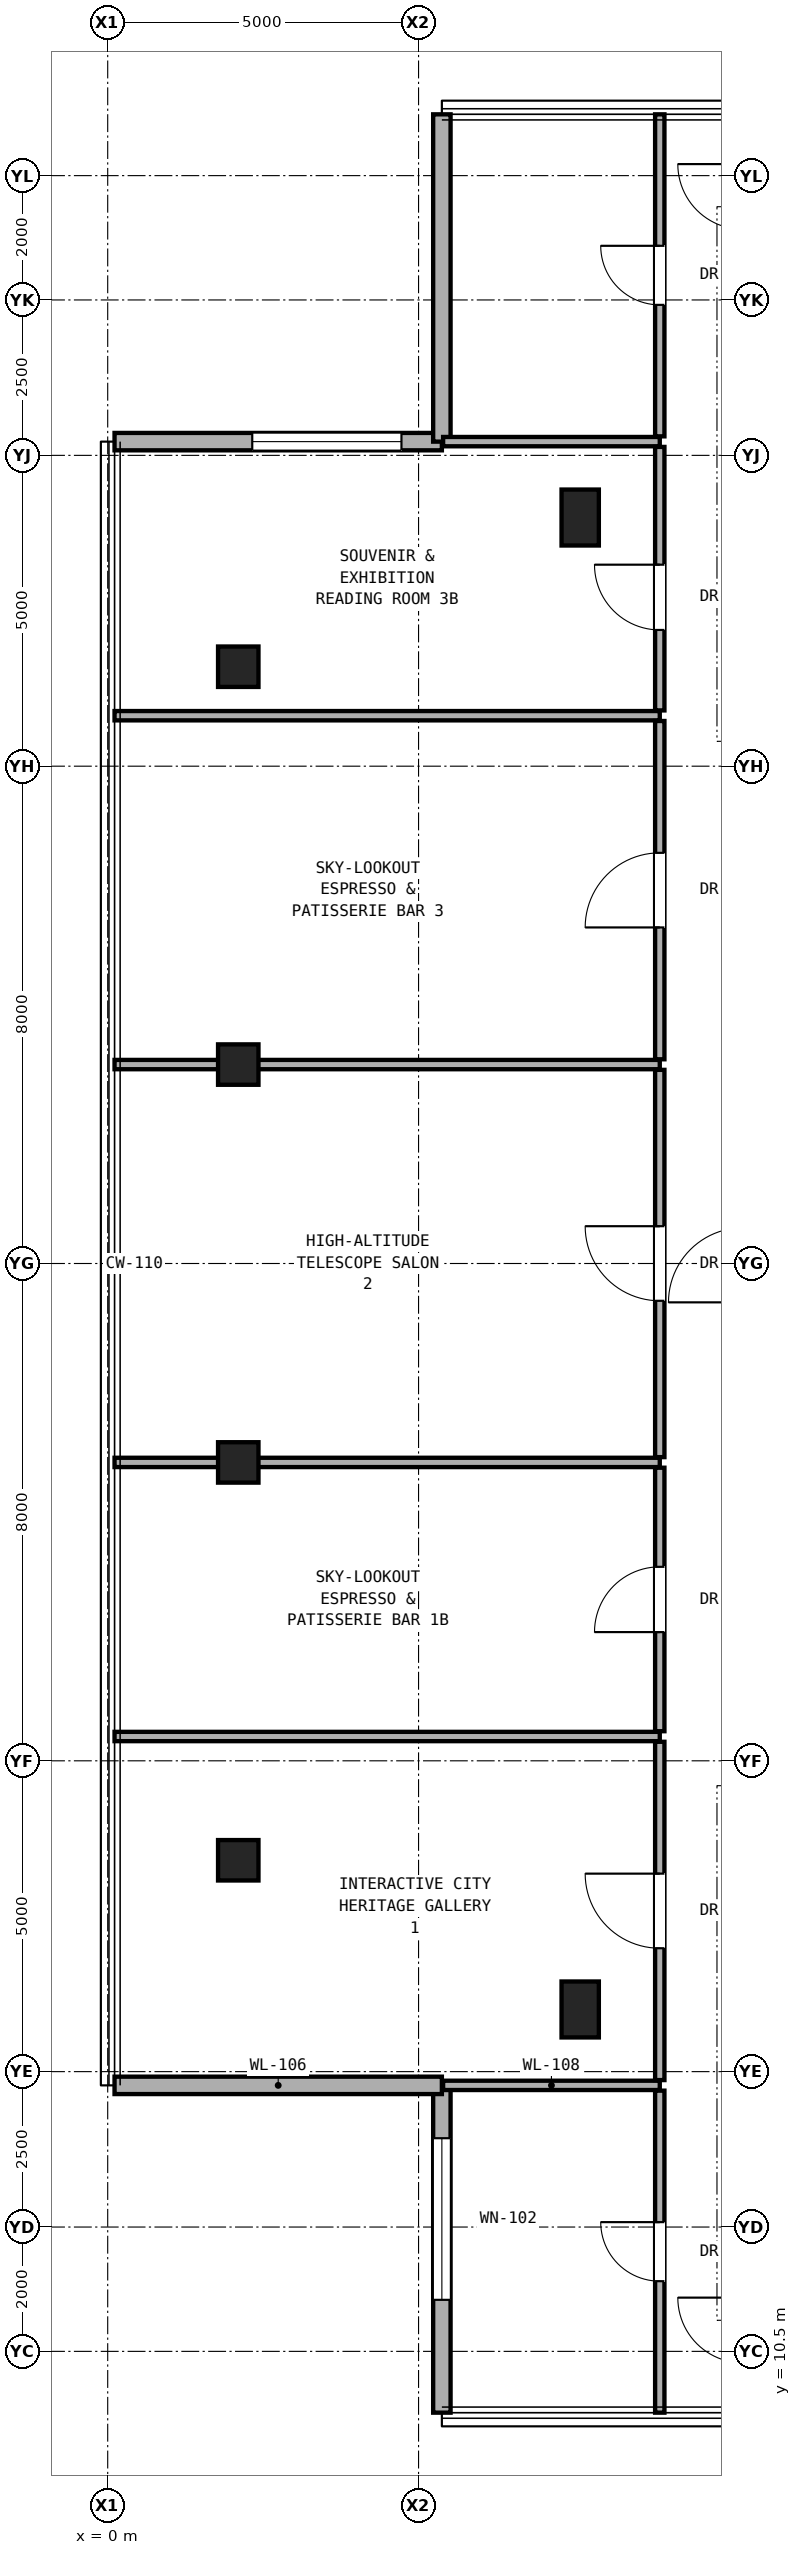
"""IFC4 building model, lengths in metres.
Left out: names, types, materials, properties, quantities, classifications, styles, units other than length and angle.
Written with IfcOpenShell. Run it as: python <this file> out.ifc"""

import sys

from ifc_helpers import new_model, si_unit, direction, frame, frame_2d, origin, origin_2d, place, context, subcontext, project, spatial, rectangle, hollow_rectangle, extrude, element, fill, save


model = new_model("IFC4")
c1 = context("Model", 3, precision=1e-05, world=origin(), true_north=direction((0.0, 1.0)))
c2 = subcontext(c1, "Body", "Model", "MODEL_VIEW")
j1 = project(units=[si_unit("LENGTHUNIT", "METRE"), si_unit("PLANEANGLEUNIT", "RADIAN")], contexts=[c1])
p1 = place(None, origin())
s1 = spatial("IfcSite", under=j1, at=p1, CompositionType="ELEMENT")
p2 = place(p1, origin())
s2 = spatial("IfcBuilding", under=s1, at=p2, CompositionType="ELEMENT")
p3 = place(p2, frame((0.0, 0.0, 256.3)))
s3 = spatial("IfcBuildingStorey", under=s2, at=p3, CompositionType="ELEMENT", Elevation=256.3)
for number, where, z_axis, x_axis in (
    (1, (2.1, 18.4, 0.0), (0.0, 0.0, 1.0), (1.0, 0.0, 0.0)),
    (2, (2.1, 24.8, 0.0), (0.0, 0.0, 1.0), (1.0, 0.0, 0.0)),
    (3, (2.1, 31.2, 0.0), (0.0, 0.0, 1.0), (1.0, 0.0, 0.0)),
    (4, (2.1, 37.6, 0.0), (0.0, 0.0, 1.0), (1.0, 0.0, 0.0)),
):
    element("IfcColumn", number, at=place(p3, frame(where, z_axis=z_axis, x_axis=x_axis)), inside=s3, PredefinedType="COLUMN", context=c2, shape_type="SweptSolid", body=[
        extrude(hollow_rectangle(XDim=0.65, YDim=0.65, WallThickness=0.036, at=origin_2d()), origin(), (0.0, 0.0, 1.0), 3.6),
    ])
for number, where, z_axis, x_axis in (
    (5, (7.6, 16.0, 0.0), (0.0, 0.0, 1.0), (1.0, 0.0, 0.0)),
    (6, (7.6, 40.0, 0.0), (0.0, 0.0, 1.0), (1.0, 0.0, 0.0)),
):
    element("IfcColumn", number, at=place(p3, frame(where, z_axis=z_axis, x_axis=x_axis)), inside=s3, PredefinedType="PILASTER", context=c2, shape_type="SweptSolid", body=[
        extrude(rectangle(XDim=0.6, YDim=0.9, at=origin_2d()), origin(), (0.0, 0.0, 1.0), 3.6),
    ])
p4 = place(p3, frame((5.375, 14.779, 0.0), z_axis=(0.0, 0.0, 1.0), x_axis=(0.0, -1.0, 0.0)))
e7 = element("IfcWall", 7, at=p4, inside=s3, PredefinedType="SOLIDWALL", context=c2, shape_type="SweptSolid", body=[
    extrude(rectangle(XDim=5.265, YDim=0.28, at=frame_2d((2.633, 0.0))), origin(), (0.0, 0.0, 1.0), 3.38),
])
p5 = place(p4, frame((0.85, 0.0, 0.63)))
e8 = element("IfcOpeningElement", 8, at=p5, cuts=e7, PredefinedType="OPENING", context=c2, shape_type="SweptSolid", body=[
    extrude(rectangle(XDim=2.6, YDim=2.6, at=frame_2d((1.3, 1.3))), frame((0.0, 0.15, 0.0), z_axis=(0.0, -1.0, 0.0), x_axis=(1.0, 0.0, 0.0)), (0.0, 0.0, 1.0), 0.3),
])
p6 = place(p3, frame((0.11, 14.779, 0.0), z_axis=(0.0, 0.0, 1.0), x_axis=(1.0, 0.0, 0.0)))
e9 = element("IfcWall", 9, at=p6, inside=s3, PredefinedType="SOLIDWALL", context=c2, shape_type="SweptSolid", body=[
    extrude(rectangle(XDim=5.265, YDim=0.28, at=frame_2d((2.632, 0.0))), origin(), (0.0, 0.0, 1.0), 3.38),
])
p7 = place(p3, frame((5.375, 41.221, 0.0), z_axis=(0.0, 0.0, 1.0), x_axis=(-1.0, 0.0, 0.0)))
e10 = element("IfcWall", 10, at=p7, inside=s3, PredefinedType="SOLIDWALL", context=c2, shape_type="SweptSolid", body=[
    extrude(rectangle(XDim=5.265, YDim=0.28, at=frame_2d((2.632, 0.0))), origin(), (0.0, 0.0, 1.0), 3.38),
])
p8 = place(p7, frame((0.65, 0.0, 0.85)))
e11 = element("IfcOpeningElement", 11, at=p8, cuts=e10, PredefinedType="OPENING", context=c2, shape_type="SweptSolid", body=[
    extrude(rectangle(XDim=2.4, YDim=2.35, at=frame_2d((1.2, 1.175))), frame((0.0, 0.15, 0.0), z_axis=(0.0, -1.0, 0.0), x_axis=(1.0, 0.0, 0.0)), (0.0, 0.0, 1.0), 0.3),
])
p9 = place(p3, frame((5.375, 46.486, 0.0), z_axis=(0.0, 0.0, 1.0), x_axis=(0.0, -1.0, 0.0)))
e12 = element("IfcWall", 12, at=p9, inside=s3, PredefinedType="SOLIDWALL", context=c2, shape_type="SweptSolid", body=[
    extrude(rectangle(XDim=5.265, YDim=0.28, at=frame_2d((2.633, 0.0))), origin(), (0.0, 0.0, 1.0), 3.38),
])
p10 = place(p3, frame((5.395, 14.779, 0.0), z_axis=(0.0, 0.0, 1.0), x_axis=(1.0, 0.0, 0.0)))
e13 = element("IfcWall", 13, at=p10, inside=s3, PredefinedType="PARTITIONING", context=c2, shape_type="SweptSolid", body=[
    extrude(rectangle(XDim=3.485, YDim=0.15, at=frame_2d((1.742, 0.0))), origin(), (0.0, 0.0, 1.0), 3.4),
])
for number, where, z_axis, x_axis in (
    (14, (0.11, 20.391, 0.0), (0.0, 0.0, 1.0), (1.0, 0.0, 0.0)),
    (15, (0.11, 24.8, 0.0), (0.0, 0.0, 1.0), (1.0, 0.0, 0.0)),
    (16, (0.11, 31.2, 0.0), (0.0, 0.0, 1.0), (1.0, 0.0, 0.0)),
    (17, (0.11, 36.812, 0.0), (0.0, 0.0, 1.0), (1.0, 0.0, 0.0)),
):
    element("IfcWall", number, at=place(p3, frame(where, z_axis=z_axis, x_axis=x_axis)), inside=s3, PredefinedType="PARTITIONING", context=c2, shape_type="SweptSolid", body=[
        extrude(rectangle(XDim=8.77, YDim=0.15, at=frame_2d((4.385, 0.0))), origin(), (0.0, 0.0, 1.0), 2.619),
    ])
p11 = place(p3, frame((5.395, 41.221, 0.0), z_axis=(0.0, 0.0, 1.0), x_axis=(1.0, 0.0, 0.0)))
e18 = element("IfcWall", 18, at=p11, inside=s3, PredefinedType="PARTITIONING", context=c2, shape_type="SweptSolid", body=[
    extrude(rectangle(XDim=3.485, YDim=0.15, at=frame_2d((1.742, 0.0))), origin(), (0.0, 0.0, 1.0), 3.4),
])
p12 = place(p3, frame((8.88, 9.514, 0.0), z_axis=(0.0, 0.0, 1.0), x_axis=(0.0, 1.0, 0.0)))
e19 = element("IfcWall", 19, at=p12, inside=s3, PredefinedType="PARTITIONING", context=c2, shape_type="SweptSolid", body=[
    extrude(rectangle(XDim=5.18, YDim=0.15, at=frame_2d((2.59, 0.0))), origin(), (0.0, 0.0, 1.0), 3.4),
])
p13 = place(p12, frame((2.115, 0.0, 0.0)))
e20 = element("IfcOpeningElement", 20, at=p13, cuts=e19, PredefinedType="OPENING", context=c2, shape_type="SweptSolid", body=[
    extrude(rectangle(XDim=0.95, YDim=2.15, at=frame_2d((0.475, 1.075))), frame((0.0, 0.085, 0.0), z_axis=(0.0, -1.0, 0.0), x_axis=(1.0, 0.0, 0.0)), (0.0, 0.0, 1.0), 0.17),
])
p14 = place(p3, frame((8.88, 14.864, 0.0), z_axis=(0.0, 0.0, 1.0), x_axis=(0.0, 1.0, 0.0)))
e21 = element("IfcWall", 21, at=p14, inside=s3, PredefinedType="PARTITIONING", context=c2, shape_type="SweptSolid", body=[
    extrude(rectangle(XDim=5.442, YDim=0.15, at=frame_2d((2.721, 0.0))), origin(), (0.0, 0.0, 1.0), 2.792),
])
p15 = place(p14, frame((2.121, 0.0, 0.0)))
e22 = element("IfcOpeningElement", 22, at=p15, cuts=e21, PredefinedType="OPENING", context=c2, shape_type="SweptSolid", body=[
    extrude(rectangle(XDim=1.2, YDim=2.25, at=frame_2d((0.6, 1.125))), frame((0.0, 0.085, 0.0), z_axis=(0.0, -1.0, 0.0), x_axis=(1.0, 0.0, 0.0)), (0.0, 0.0, 1.0), 0.17),
])
p16 = place(p3, frame((8.88, 20.476, 0.0), z_axis=(0.0, 0.0, 1.0), x_axis=(0.0, 1.0, 0.0)))
e23 = element("IfcWall", 23, at=p16, inside=s3, PredefinedType="PARTITIONING", context=c2, shape_type="SweptSolid", body=[
    extrude(rectangle(XDim=4.239, YDim=0.15, at=frame_2d((2.12, 0.0))), origin(), (0.0, 0.0, 1.0), 2.696),
])
p17 = place(p16, frame((1.594, 0.0, 0.0)))
e24 = element("IfcOpeningElement", 24, at=p17, cuts=e23, PredefinedType="OPENING", context=c2, shape_type="SweptSolid", body=[
    extrude(rectangle(XDim=1.05, YDim=2.2, at=frame_2d((0.525, 1.1))), frame((0.0, 0.085, 0.0), z_axis=(0.0, -1.0, 0.0), x_axis=(1.0, 0.0, 0.0)), (0.0, 0.0, 1.0), 0.17),
])
p18 = place(p3, frame((8.88, 24.885, 0.0), z_axis=(0.0, 0.0, 1.0), x_axis=(0.0, 1.0, 0.0)))
e25 = element("IfcWall", 25, at=p18, inside=s3, PredefinedType="PARTITIONING", context=c2, shape_type="SweptSolid", body=[
    extrude(rectangle(XDim=6.23, YDim=0.15, at=frame_2d((3.115, 0.0))), origin(), (0.0, 0.0, 1.0), 2.696),
])
p19 = place(p18, frame((2.515, 0.0, 0.0)))
e26 = element("IfcOpeningElement", 26, at=p19, cuts=e25, PredefinedType="OPENING", context=c2, shape_type="SweptSolid", body=[
    extrude(rectangle(XDim=1.2, YDim=2.25, at=frame_2d((0.6, 1.125))), frame((0.0, 0.085, 0.0), z_axis=(0.0, -1.0, 0.0), x_axis=(1.0, 0.0, 0.0)), (0.0, 0.0, 1.0), 0.17),
])
p20 = place(p3, frame((8.88, 31.285, 0.0), z_axis=(0.0, 0.0, 1.0), x_axis=(0.0, 1.0, 0.0)))
e27 = element("IfcWall", 27, at=p20, inside=s3, PredefinedType="PARTITIONING", context=c2, shape_type="SweptSolid", body=[
    extrude(rectangle(XDim=5.442, YDim=0.15, at=frame_2d((2.721, 0.0))), origin(), (0.0, 0.0, 1.0), 2.696),
])
p21 = place(p20, frame((2.121, 0.0, 0.0)))
e28 = element("IfcOpeningElement", 28, at=p21, cuts=e27, PredefinedType="OPENING", context=c2, shape_type="SweptSolid", body=[
    extrude(rectangle(XDim=1.2, YDim=2.25, at=frame_2d((0.6, 1.125))), frame((0.0, 0.085, 0.0), z_axis=(0.0, -1.0, 0.0), x_axis=(1.0, 0.0, 0.0)), (0.0, 0.0, 1.0), 0.17),
])
p22 = place(p3, frame((8.88, 36.897, 0.0), z_axis=(0.0, 0.0, 1.0), x_axis=(0.0, 1.0, 0.0)))
e29 = element("IfcWall", 29, at=p22, inside=s3, PredefinedType="PARTITIONING", context=c2, shape_type="SweptSolid", body=[
    extrude(rectangle(XDim=4.239, YDim=0.15, at=frame_2d((2.12, 0.0))), origin(), (0.0, 0.0, 1.0), 2.792),
])
p23 = place(p22, frame((1.294, 0.0, 0.0)))
e30 = element("IfcOpeningElement", 30, at=p23, cuts=e29, PredefinedType="OPENING", context=c2, shape_type="SweptSolid", body=[
    extrude(rectangle(XDim=1.05, YDim=2.2, at=frame_2d((0.525, 1.1))), frame((0.0, 0.085, 0.0), z_axis=(0.0, -1.0, 0.0), x_axis=(1.0, 0.0, 0.0)), (0.0, 0.0, 1.0), 0.17),
])
p24 = place(p3, frame((8.88, 41.306, 0.0), z_axis=(0.0, 0.0, 1.0), x_axis=(0.0, 1.0, 0.0)))
e31 = element("IfcWall", 31, at=p24, inside=s3, PredefinedType="PARTITIONING", context=c2, shape_type="SweptSolid", body=[
    extrude(rectangle(XDim=5.18, YDim=0.15, at=frame_2d((2.59, 0.0))), origin(), (0.0, 0.0, 1.0), 3.4),
])
p25 = place(p24, frame((2.115, 0.0, 0.0)))
e32 = element("IfcOpeningElement", 32, at=p25, cuts=e31, PredefinedType="OPENING", context=c2, shape_type="SweptSolid", body=[
    extrude(rectangle(XDim=0.95, YDim=2.15, at=frame_2d((0.475, 1.075))), frame((0.0, 0.085, 0.0), z_axis=(0.0, -1.0, 0.0), x_axis=(1.0, 0.0, 0.0)), (0.0, 0.0, 1.0), 0.17),
])
p26 = place(p5, origin())
e33 = element("IfcWindow", 33, at=p26, inside=s3, PartitioningType="SINGLE_PANEL", PredefinedType="WINDOW", context=c2, shape_type="SweptSolid", body=[
    extrude(rectangle(XDim=2.6, YDim=2.6, at=frame_2d((1.3, 1.3))), frame((0.0, 0.03, 0.0), z_axis=(0.0, -1.0, 0.0), x_axis=(1.0, 0.0, 0.0)), (0.0, 0.0, 1.0), 0.06),
])
fill(e8, e33)
p27 = place(p8, origin())
e34 = element("IfcWindow", 34, at=p27, inside=s3, PartitioningType="SINGLE_PANEL", PredefinedType="WINDOW", context=c2, shape_type="SweptSolid", body=[
    extrude(rectangle(XDim=2.4, YDim=2.35, at=frame_2d((1.2, 1.175))), frame((0.0, 0.03, 0.0), z_axis=(0.0, -1.0, 0.0), x_axis=(1.0, 0.0, 0.0)), (0.0, 0.0, 1.0), 0.06),
])
fill(e11, e34)
p28 = place(p15, origin())
e35 = element("IfcDoor", 35, at=p28, inside=s3, OperationType="SINGLE_SWING_RIGHT", PredefinedType="DOOR", context=c2, shape_type="SweptSolid", body=[
    extrude(rectangle(XDim=1.2, YDim=2.25, at=frame_2d((0.6, 1.125))), frame((0.0, 0.025, 0.0), z_axis=(0.0, -1.0, 0.0), x_axis=(1.0, 0.0, 0.0)), (0.0, 0.0, 1.0), 0.05),
])
fill(e22, e35)
p29 = place(p17, origin())
e36 = element("IfcDoor", 36, at=p29, inside=s3, OperationType="SINGLE_SWING_LEFT", PredefinedType="DOOR", context=c2, shape_type="SweptSolid", body=[
    extrude(rectangle(XDim=1.05, YDim=2.2, at=frame_2d((0.525, 1.1))), frame((0.0, 0.025, 0.0), z_axis=(0.0, -1.0, 0.0), x_axis=(1.0, 0.0, 0.0)), (0.0, 0.0, 1.0), 0.05),
])
fill(e24, e36)
p30 = place(p19, origin())
e37 = element("IfcDoor", 37, at=p30, inside=s3, OperationType="SINGLE_SWING_RIGHT", PredefinedType="DOOR", context=c2, shape_type="SweptSolid", body=[
    extrude(rectangle(XDim=1.2, YDim=2.25, at=frame_2d((0.6, 1.125))), frame((0.0, 0.025, 0.0), z_axis=(0.0, -1.0, 0.0), x_axis=(1.0, 0.0, 0.0)), (0.0, 0.0, 1.0), 0.05),
])
fill(e26, e37)
p31 = place(p21, origin())
e38 = element("IfcDoor", 38, at=p31, inside=s3, OperationType="SINGLE_SWING_LEFT", PredefinedType="DOOR", context=c2, shape_type="SweptSolid", body=[
    extrude(rectangle(XDim=1.2, YDim=2.25, at=frame_2d((0.6, 1.125))), frame((0.0, 0.025, 0.0), z_axis=(0.0, -1.0, 0.0), x_axis=(1.0, 0.0, 0.0)), (0.0, 0.0, 1.0), 0.05),
])
fill(e28, e38)
p32 = place(p23, origin())
e39 = element("IfcDoor", 39, at=p32, inside=s3, OperationType="SINGLE_SWING_RIGHT", PredefinedType="DOOR", context=c2, shape_type="SweptSolid", body=[
    extrude(rectangle(XDim=1.05, YDim=2.2, at=frame_2d((0.525, 1.1))), frame((0.0, 0.025, 0.0), z_axis=(0.0, -1.0, 0.0), x_axis=(1.0, 0.0, 0.0)), (0.0, 0.0, 1.0), 0.05),
])
fill(e30, e39)
p33 = place(p13, origin())
e40 = element("IfcDoor", 40, at=p33, inside=s3, OperationType="SINGLE_SWING_RIGHT", PredefinedType="DOOR", context=c2, shape_type="SweptSolid", body=[
    extrude(rectangle(XDim=0.95, YDim=2.15, at=frame_2d((0.475, 1.075))), frame((0.0, 0.025, 0.0), z_axis=(0.0, -1.0, 0.0), x_axis=(1.0, 0.0, 0.0)), (0.0, 0.0, 1.0), 0.05),
])
fill(e20, e40)
p34 = place(p25, origin())
e41 = element("IfcDoor", 41, at=p34, inside=s3, OperationType="SINGLE_SWING_RIGHT", PredefinedType="DOOR", context=c2, shape_type="SweptSolid", body=[
    extrude(rectangle(XDim=0.95, YDim=2.15, at=frame_2d((0.475, 1.075))), frame((0.0, 0.025, 0.0), z_axis=(0.0, -1.0, 0.0), x_axis=(1.0, 0.0, 0.0)), (0.0, 0.0, 1.0), 0.05),
])
fill(e32, e41)
save(model, sys.argv[1])
